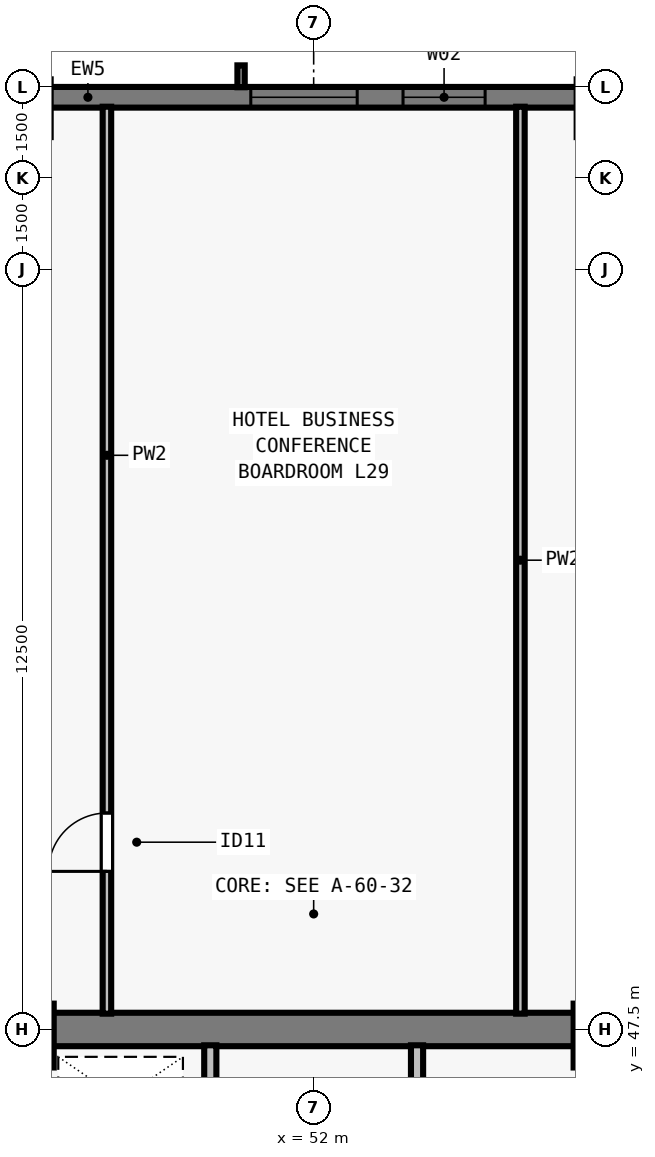
"""IFC4 building model, lengths in metres.
Left out: names, types, materials, properties, quantities, classifications, styles, units other than length and angle.
Written with IfcOpenShell. Run it as: python <this file> out.ifc"""

import sys

from ifc_helpers import new_model, si_unit, direction, frame, frame_2d, origin, origin_2d, place, context, subcontext, project, spatial, rectangle, extrude, element, fill, save


model = new_model("IFC4")
c1 = context("Model", 3, precision=1e-05, world=origin(), true_north=direction((0.0, 1.0)))
c2 = subcontext(c1, "Body", "Model", "MODEL_VIEW")
j1 = project(units=[si_unit("LENGTHUNIT", "METRE"), si_unit("PLANEANGLEUNIT", "RADIAN")], contexts=[c1])
p1 = place(None, origin())
s1 = spatial("IfcSite", under=j1, at=p1, CompositionType="ELEMENT")
p2 = place(p1, origin())
s2 = spatial("IfcBuilding", under=s1, at=p2, CompositionType="ELEMENT")
p3 = place(p2, frame((0.0, 0.0, 109.5)))
s3 = spatial("IfcBuildingStorey", under=s2, at=p3, CompositionType="ELEMENT", Elevation=109.5)
for number, where, z_axis, x_axis in (
    (1, (47.2, 47.4, 0.0), (0.0, 0.0, 1.0), (1.0, 0.0, 0.0)),
    (2, (56.8, 47.4, 0.0), (0.0, 0.0, 1.0), (1.0, 0.0, 0.0)),
):
    element("IfcColumn", number, at=place(p3, frame(where, z_axis=z_axis, x_axis=x_axis)), inside=s3, PredefinedType="COLUMN", context=c2, shape_type="SweptSolid", body=[
        extrude(rectangle(XDim=1.05, YDim=1.05, at=origin_2d()), origin(), (0.0, 0.0, 1.0), 3.5),
    ])
p4 = place(p3, frame((32.0, 62.83, 0.0), z_axis=(0.0, 0.0, 1.0), x_axis=(1.0, 0.0, 0.0)))
e3 = element("IfcWall", 3, at=p4, inside=s3, PredefinedType="SOLIDWALL", context=c2, shape_type="SweptSolid", body=[
    extrude(rectangle(XDim=39.682, YDim=0.34, at=frame_2d((19.841, 0.0))), origin(), (0.0, 0.0, 1.0), 3.28),
])
p5 = place(p4, frame((4.302, 0.0, 0.8)))
e4 = element("IfcOpeningElement", 4, at=p5, cuts=e3, PredefinedType="OPENING", context=c2, shape_type="SweptSolid", body=[
    extrude(rectangle(XDim=1.75, YDim=1.66, at=frame_2d((0.875, 0.83))), frame((0.0, 0.18, 0.0), z_axis=(0.0, -1.0, 0.0), x_axis=(1.0, 0.0, 0.0)), (0.0, 0.0, 1.0), 0.36),
])
p6 = place(p4, frame((9.355, 0.0, 0.8)))
e5 = element("IfcOpeningElement", 5, at=p6, cuts=e3, PredefinedType="OPENING", context=c2, shape_type="SweptSolid", body=[
    extrude(rectangle(XDim=1.35, YDim=1.66, at=frame_2d((0.675, 0.83))), frame((0.0, 0.18, 0.0), z_axis=(0.0, -1.0, 0.0), x_axis=(1.0, 0.0, 0.0)), (0.0, 0.0, 1.0), 0.36),
])
p7 = place(p4, frame((11.859, 0.0, 0.8)))
e6 = element("IfcOpeningElement", 6, at=p7, cuts=e3, PredefinedType="OPENING", context=c2, shape_type="SweptSolid", body=[
    extrude(rectangle(XDim=1.75, YDim=1.66, at=frame_2d((0.875, 0.83))), frame((0.0, 0.18, 0.0), z_axis=(0.0, -1.0, 0.0), x_axis=(1.0, 0.0, 0.0)), (0.0, 0.0, 1.0), 0.36),
])
p8 = place(p4, frame((18.966, 0.0, 0.8)))
e7 = element("IfcOpeningElement", 7, at=p8, cuts=e3, PredefinedType="OPENING", context=c2, shape_type="SweptSolid", body=[
    extrude(rectangle(XDim=1.75, YDim=1.66, at=frame_2d((0.875, 0.83))), frame((0.0, 0.18, 0.0), z_axis=(0.0, -1.0, 0.0), x_axis=(1.0, 0.0, 0.0)), (0.0, 0.0, 1.0), 0.36),
])
p9 = place(p4, frame((21.469, 0.0, 0.8)))
e8 = element("IfcOpeningElement", 8, at=p9, cuts=e3, PredefinedType="OPENING", context=c2, shape_type="SweptSolid", body=[
    extrude(rectangle(XDim=1.35, YDim=1.66, at=frame_2d((0.675, 0.83))), frame((0.0, 0.18, 0.0), z_axis=(0.0, -1.0, 0.0), x_axis=(1.0, 0.0, 0.0)), (0.0, 0.0, 1.0), 0.36),
])
p10 = place(p4, frame((26.073, 0.0, 0.8)))
e9 = element("IfcOpeningElement", 9, at=p10, cuts=e3, PredefinedType="OPENING", context=c2, shape_type="SweptSolid", body=[
    extrude(rectangle(XDim=1.75, YDim=1.66, at=frame_2d((0.875, 0.83))), frame((0.0, 0.18, 0.0), z_axis=(0.0, -1.0, 0.0), x_axis=(1.0, 0.0, 0.0)), (0.0, 0.0, 1.0), 0.36),
])
p11 = place(p4, frame((29.377, 0.0, 0.8)))
e10 = element("IfcOpeningElement", 10, at=p11, cuts=e3, PredefinedType="OPENING", context=c2, shape_type="SweptSolid", body=[
    extrude(rectangle(XDim=1.35, YDim=1.66, at=frame_2d((0.675, 0.83))), frame((0.0, 0.18, 0.0), z_axis=(0.0, -1.0, 0.0), x_axis=(1.0, 0.0, 0.0)), (0.0, 0.0, 1.0), 0.36),
])
p12 = place(p4, frame((33.63, 0.0, 0.8)))
e11 = element("IfcOpeningElement", 11, at=p12, cuts=e3, PredefinedType="OPENING", context=c2, shape_type="SweptSolid", body=[
    extrude(rectangle(XDim=1.75, YDim=1.66, at=frame_2d((0.875, 0.83))), frame((0.0, 0.18, 0.0), z_axis=(0.0, -1.0, 0.0), x_axis=(1.0, 0.0, 0.0)), (0.0, 0.0, 1.0), 0.36),
])
p13 = place(p3, frame((43.225, 47.5, 0.0), z_axis=(0.0, 0.0, 1.0), x_axis=(1.0, 0.0, 0.0)))
e12 = element("IfcWall", 12, at=p13, inside=s3, PredefinedType="SHEAR", context=c2, shape_type="SweptSolid", body=[
    extrude(rectangle(XDim=17.55, YDim=0.55, at=frame_2d((8.775, 0.0))), origin(), (0.0, 0.0, 1.0), 3.28),
])
p14 = place(p3, frame((50.3, 40.585, 0.0), z_axis=(0.0, 0.0, 1.0), x_axis=(0.0, 1.0, 0.0)))
e13 = element("IfcWall", 13, at=p14, inside=s3, PredefinedType="SOLIDWALL", context=c2, shape_type="SweptSolid", body=[
    extrude(rectangle(XDim=6.655, YDim=0.2, at=frame_2d((3.328, 0.0))), origin(), (0.0, 0.0, 1.0), 3.28),
])
p15 = place(p14, frame((5.065, 0.0, 0.0)))
e14 = element("IfcOpeningElement", 14, at=p15, cuts=e13, PredefinedType="OPENING", context=c2, shape_type="SweptSolid", body=[
    extrude(rectangle(XDim=0.8, YDim=2.08, at=frame_2d((0.4, 1.04))), frame((0.0, 0.11, 0.0), z_axis=(0.0, -1.0, 0.0), x_axis=(1.0, 0.0, 0.0)), (0.0, 0.0, 1.0), 0.22),
])
p16 = place(p3, frame((53.7, 40.585, 0.0), z_axis=(0.0, 0.0, 1.0), x_axis=(0.0, 1.0, 0.0)))
e15 = element("IfcWall", 15, at=p16, inside=s3, PredefinedType="SOLIDWALL", context=c2, shape_type="SweptSolid", body=[
    extrude(rectangle(XDim=6.655, YDim=0.2, at=frame_2d((3.328, 0.0))), origin(), (0.0, 0.0, 1.0), 3.28),
])
p17 = place(p16, frame((0.195, 0.0, 0.0)))
e16 = element("IfcOpeningElement", 16, at=p17, cuts=e15, PredefinedType="OPENING", context=c2, shape_type="SweptSolid", body=[
    extrude(rectangle(XDim=0.8, YDim=2.08, at=frame_2d((0.4, 1.04))), frame((0.0, 0.11, 0.0), z_axis=(0.0, -1.0, 0.0), x_axis=(1.0, 0.0, 0.0)), (0.0, 0.0, 1.0), 0.22),
])
p18 = place(p16, frame((4.265, 0.0, 0.0)))
e17 = element("IfcOpeningElement", 17, at=p18, cuts=e15, PredefinedType="OPENING", context=c2, shape_type="SweptSolid", body=[
    extrude(rectangle(XDim=0.95, YDim=2.12, at=frame_2d((0.475, 1.06))), frame((0.0, 0.11, 0.0), z_axis=(0.0, -1.0, 0.0), x_axis=(1.0, 0.0, 0.0)), (0.0, 0.0, 1.0), 0.22),
])
p19 = place(p3, frame((48.6, 47.76, 0.0), z_axis=(0.0, 0.0, 1.0), x_axis=(0.0, 1.0, 0.0)))
e18 = element("IfcWall", 18, at=p19, inside=s3, PredefinedType="PARTITIONING", context=c2, shape_type="SweptSolid", body=[
    extrude(rectangle(XDim=14.915, YDim=0.14, at=frame_2d((7.458, 0.0))), origin(), (0.0, 0.0, 1.0), 2.896),
])
p20 = place(p19, frame((2.34, 0.0, 0.0)))
e19 = element("IfcOpeningElement", 19, at=p20, cuts=e18, PredefinedType="OPENING", context=c2, shape_type="SweptSolid", body=[
    extrude(rectangle(XDim=0.96, YDim=2.12, at=frame_2d((0.48, 1.06))), frame((0.0, 0.08, 0.0), z_axis=(0.0, -1.0, 0.0), x_axis=(1.0, 0.0, 0.0)), (0.0, 0.0, 1.0), 0.16),
])
p21 = place(p3, frame((55.4, 47.76, 0.0), z_axis=(0.0, 0.0, 1.0), x_axis=(0.0, 1.0, 0.0)))
e20 = element("IfcWall", 20, at=p21, inside=s3, PredefinedType="PARTITIONING", context=c2, shape_type="SweptSolid", body=[
    extrude(rectangle(XDim=14.915, YDim=0.14, at=frame_2d((7.458, 0.0))), origin(), (0.0, 0.0, 1.0), 2.896),
])
p22 = place(p8, origin())
e21 = element("IfcWindow", 21, at=p22, inside=s3, PartitioningType="SINGLE_PANEL", PredefinedType="WINDOW", context=c2, shape_type="SweptSolid", body=[
    extrude(rectangle(XDim=1.75, YDim=1.66, at=frame_2d((0.875, 0.83))), frame((0.0, -0.05, 0.0), z_axis=(0.0, -1.0, 0.0), x_axis=(1.0, 0.0, 0.0)), (0.0, 0.0, 1.0), 0.06),
])
fill(e7, e21)
p23 = place(p9, origin())
e22 = element("IfcWindow", 22, at=p23, inside=s3, PartitioningType="SINGLE_PANEL", PredefinedType="WINDOW", context=c2, shape_type="SweptSolid", body=[
    extrude(rectangle(XDim=1.35, YDim=1.66, at=frame_2d((0.675, 0.83))), frame((0.0, -0.05, 0.0), z_axis=(0.0, -1.0, 0.0), x_axis=(1.0, 0.0, 0.0)), (0.0, 0.0, 1.0), 0.06),
])
fill(e8, e22)
p24 = place(p20, origin())
e23 = element("IfcDoor", 23, at=p24, inside=s3, OperationType="SINGLE_SWING_LEFT", PredefinedType="DOOR", context=c2, shape_type="SweptSolid", body=[
    extrude(rectangle(XDim=0.96, YDim=2.12, at=frame_2d((0.48, 1.06))), frame((0.0, 0.025, 0.0), z_axis=(0.0, -1.0, 0.0), x_axis=(1.0, 0.0, 0.0)), (0.0, 0.0, 1.0), 0.05),
])
fill(e19, e23)
save(model, sys.argv[1])
